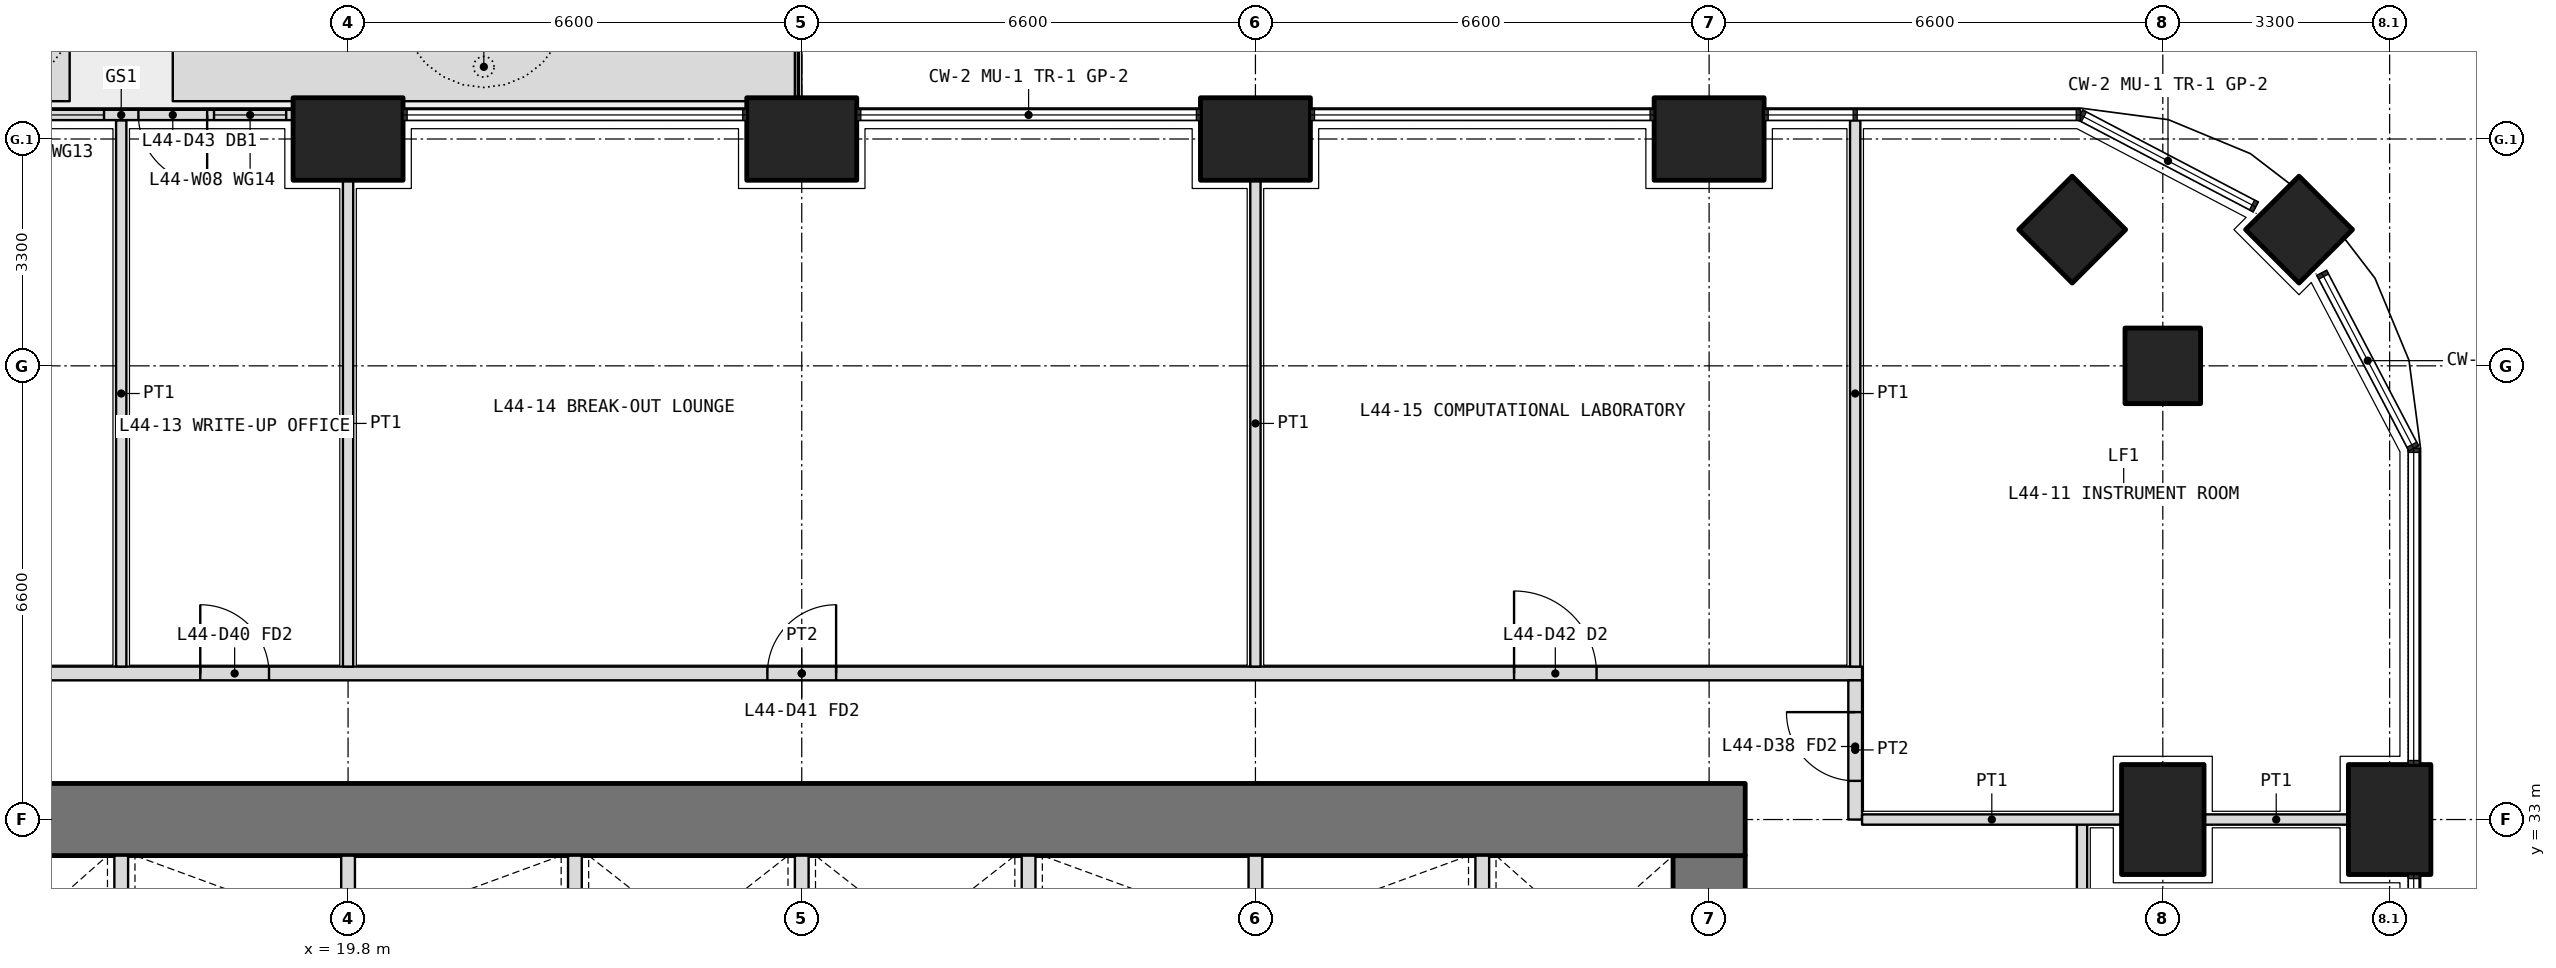
"""IFC4 building model, lengths in metres.
Left out: names, types, materials, properties, quantities, classifications, styles, units other than length and angle.
Written with IfcOpenShell. Run it as: python <this file> out.ifc"""

import sys

from ifc_helpers import new_model, si_unit, direction, frame, frame_2d, origin, origin_2d, place, context, subcontext, project, spatial, polyline, rectangle, outline, extrude, element, fill, save


model = new_model("IFC4")
c1 = context("Model", 3, precision=1e-05, world=origin(), true_north=direction((0.0, 1.0)))
c2 = subcontext(c1, "Body", "Model", "MODEL_VIEW")
j1 = project(units=[si_unit("LENGTHUNIT", "METRE"), si_unit("PLANEANGLEUNIT", "RADIAN")], contexts=[c1])
p1 = place(None, origin())
s1 = spatial("IfcSite", under=j1, at=p1, CompositionType="ELEMENT")
p2 = place(p1, origin())
s2 = spatial("IfcBuilding", under=s1, at=p2, CompositionType="ELEMENT")
p3 = place(p2, frame((0.0, 0.0, 193.5)))
s3 = spatial("IfcBuildingStorey", under=s2, at=p3, CompositionType="ELEMENT", Elevation=193.5)
p4 = place(p3, frame((48.182, 41.582, 0.0), z_axis=(0.0, 0.0, 1.0), x_axis=(0.707106781187, 0.707106781187, 0.0)))
e1 = element("IfcColumn", 1, at=p4, inside=s3, PredefinedType="COLUMN", context=c2, shape_type="SweptSolid", body=[
    extrude(rectangle(XDim=1.1, YDim=1.1, at=origin_2d()), origin(), (0.0, 0.0, 1.0), 4.2),
])
for number, where, z_axis, x_axis in (
    (2, (49.5, 33.0, 0.0), (0.0, 0.0, 1.0), (0.0, 1.0, 0.0)),
    (3, (19.8, 42.9, 0.0), (0.0, 0.0, 1.0), (1.0, 0.0, 0.0)),
    (4, (26.4, 42.9, 0.0), (0.0, 0.0, 1.0), (1.0, 0.0, 0.0)),
    (5, (33.0, 42.9, 0.0), (0.0, 0.0, 1.0), (1.0, 0.0, 0.0)),
    (6, (39.6, 42.9, 0.0), (0.0, 0.0, 1.0), (1.0, 0.0, 0.0)),
):
    element("IfcColumn", number, at=place(p3, frame(where, z_axis=z_axis, x_axis=x_axis)), inside=s3, PredefinedType="COLUMN", context=c2, shape_type="SweptSolid", body=[
        extrude(rectangle(XDim=1.6, YDim=1.2, at=origin_2d()), origin(), (0.0, 0.0, 1.0), 4.2),
    ])
for number, where, z_axis, x_axis in (
    (7, (46.2, 39.6, 0.0), (0.0, 0.0, 1.0), (1.0, 0.0, 0.0)),
    (8, (44.882, 41.582, 0.0), (0.0, 0.0, 1.0), (0.707, 0.707, 0.0)),
):
    element("IfcColumn", number, at=place(p3, frame(where, z_axis=z_axis, x_axis=x_axis)), inside=s3, PredefinedType="COLUMN", context=c2, shape_type="SweptSolid", body=[
        extrude(rectangle(XDim=1.1, YDim=1.1, at=origin_2d()), origin(), (0.0, 0.0, 1.0), 4.2),
    ])
p5 = place(p3, frame((46.2, 33.0, 0.0), z_axis=(0.0, 0.0, 1.0), x_axis=(0.0, 1.0, 0.0)))
e9 = element("IfcColumn", 9, at=p5, inside=s3, PredefinedType="COLUMN", context=c2, shape_type="SweptSolid", body=[
    extrude(rectangle(XDim=1.6, YDim=1.2, at=origin_2d()), origin(), (0.0, 0.0, 1.0), 4.2),
])
p6 = place(p3, origin())
e10 = element("IfcWall", 10, at=p6, inside=s3, PredefinedType="USERDEFINED", context=c2, shape_type="SweptSolid", body=[
    extrude(outline(polyline([(13.3, 43.45), (15.75, 43.45), (15.75, 44.45), (13.3, 44.45), (13.3, 43.45)]), holes=[polyline([(13.45, 43.6), (15.6, 43.6), (15.6, 44.3), (13.45, 44.3), (13.45, 43.6)])]), origin(), (0.0, 0.0, 1.0), 1.05),
])
p7 = place(p3, origin())
e11 = element("IfcWall", 11, at=p7, inside=s3, PredefinedType="USERDEFINED", context=c2, shape_type="SweptSolid", body=[
    extrude(outline(polyline([(17.25, 43.45), (26.3, 43.45), (26.3, 44.45), (17.25, 44.45), (17.25, 43.45)]), holes=[polyline([(17.4, 43.6), (26.15, 43.6), (26.15, 44.3), (17.4, 44.3), (17.4, 43.6)])]), origin(), (0.0, 0.0, 1.0), 1.05),
])
p8 = place(p3, frame((19.0, 43.25, 0.0), z_axis=(0.0, 0.0, 1.0), x_axis=(-1.0, 0.0, 0.0)))
e12 = element("IfcWall", 12, at=p8, inside=s3, PredefinedType="SOLIDWALL", context=c2, shape_type="SweptSolid", body=[
    extrude(rectangle(XDim=5.0, YDim=0.15, at=frame_2d((2.5, 0.0))), origin(), (0.0, 0.0, 1.0), 2.7),
])
p9 = place(p8, frame((1.25, 0.0, 0.0)))
e13 = element("IfcOpeningElement", 13, at=p9, cuts=e12, PredefinedType="OPENING", context=c2, shape_type="SweptSolid", body=[
    extrude(rectangle(XDim=1.0, YDim=2.4, at=frame_2d((0.5, 1.2))), frame((0.0, 0.085, 0.0), z_axis=(0.0, -1.0, 0.0), x_axis=(1.0, 0.0, 0.0)), (0.0, 0.0, 1.0), 0.17),
])
p10 = place(p8, frame((0.1, 0.0, 0.1)))
e14 = element("IfcOpeningElement", 14, at=p10, cuts=e12, PredefinedType="OPENING", context=c2, shape_type="SweptSolid", body=[
    extrude(rectangle(XDim=1.05, YDim=2.3, at=frame_2d((0.525, 1.15))), frame((0.0, 0.085, 0.0), z_axis=(0.0, -1.0, 0.0), x_axis=(1.0, 0.0, 0.0)), (0.0, 0.0, 1.0), 0.17),
])
p11 = place(p8, frame((2.75, 0.0, 0.1)))
e15 = element("IfcOpeningElement", 15, at=p11, cuts=e12, PredefinedType="OPENING", context=c2, shape_type="SweptSolid", body=[
    extrude(rectangle(XDim=2.15, YDim=2.3, at=frame_2d((1.075, 1.15))), frame((0.0, 0.085, 0.0), z_axis=(0.0, -1.0, 0.0), x_axis=(1.0, 0.0, 0.0)), (0.0, 0.0, 1.0), 0.17),
])
p12 = place(p3, frame((39.6, 13.725, 0.0), z_axis=(0.0, 0.0, 1.0), x_axis=(0.0, 1.0, 0.0)))
e16 = element("IfcWall", 16, at=p12, inside=s3, PredefinedType="SHEAR", context=c2, shape_type="SweptSolid", body=[
    extrude(rectangle(XDim=18.75, YDim=1.05, at=frame_2d((9.375, 0.0))), origin(), (0.0, 0.0, 1.0), 4.2),
])
p13 = place(p12, frame((3.025, 0.0, 0.0)))
e17 = element("IfcOpeningElement", 17, at=p13, cuts=e16, PredefinedType="OPENING", context=c2, shape_type="SweptSolid", body=[
    extrude(rectangle(XDim=1.6, YDim=2.1, at=frame_2d((0.8, 1.05))), frame((0.0, 0.535, 0.0), z_axis=(0.0, -1.0, 0.0), x_axis=(1.0, 0.0, 0.0)), (0.0, 0.0, 1.0), 1.07),
])
p14 = place(p12, frame((13.825, 0.0, 0.0)))
e18 = element("IfcOpeningElement", 18, at=p14, cuts=e16, PredefinedType="OPENING", context=c2, shape_type="SweptSolid", body=[
    extrude(rectangle(XDim=1.6, YDim=2.1, at=frame_2d((0.8, 1.05))), frame((0.0, 0.535, 0.0), z_axis=(0.0, -1.0, 0.0), x_axis=(1.0, 0.0, 0.0)), (0.0, 0.0, 1.0), 1.07),
])
p15 = place(p3, frame((40.125, 33.0, 0.0), z_axis=(0.0, 0.0, 1.0), x_axis=(-1.0, 0.0, 0.0)))
e19 = element("IfcWall", 19, at=p15, inside=s3, PredefinedType="SHEAR", context=c2, shape_type="SweptSolid", body=[
    extrude(rectangle(XDim=27.45, YDim=1.05, at=frame_2d((13.725, 0.0))), origin(), (0.0, 0.0, 1.0), 4.2),
])
for number, where, z_axis, x_axis in (
    (20, (16.5, 30.2, 0.0), (0.0, 0.0, 1.0), (0.0, 1.0, 0.0)),
    (21, (19.8, 30.2, 0.0), (0.0, 0.0, 1.0), (0.0, 1.0, 0.0)),
    (22, (23.1, 30.2, 0.0), (0.0, 0.0, 1.0), (0.0, 1.0, 0.0)),
    (23, (26.4, 30.2, 0.0), (0.0, 0.0, 1.0), (0.0, 1.0, 0.0)),
    (24, (29.7, 30.2, 0.0), (0.0, 0.0, 1.0), (0.0, 1.0, 0.0)),
    (25, (33.0, 30.2, 0.0), (0.0, 0.0, 1.0), (0.0, 1.0, 0.0)),
    (26, (36.3, 30.2, 0.0), (0.0, 0.0, 1.0), (0.0, 1.0, 0.0)),
):
    element("IfcWall", number, at=place(p3, frame(where, z_axis=z_axis, x_axis=x_axis)), inside=s3, PredefinedType="PARTITIONING", context=c2, shape_type="SweptSolid", body=[
        extrude(rectangle(XDim=2.275, YDim=0.2, at=frame_2d((1.138, 0.0))), origin(), (0.0, 0.0, 1.0), 4.2),
    ])
p16 = place(p3, frame((10.975, 35.125, 0.0), z_axis=(0.0, 0.0, 1.0), x_axis=(1.0, 0.0, 0.0)))
e27 = element("IfcWall", 27, at=p16, inside=s3, PredefinedType="PARTITIONING", context=c2, shape_type="SweptSolid", body=[
    extrude(rectangle(XDim=30.85, YDim=0.2, at=frame_2d((15.425, 0.0))), origin(), (0.0, 0.0, 1.0), 2.85),
])
p17 = place(p16, frame((2.212, 0.0, 0.0)))
e28 = element("IfcOpeningElement", 28, at=p17, cuts=e27, PredefinedType="OPENING", context=c2, shape_type="SweptSolid", body=[
    extrude(rectangle(XDim=1.2, YDim=2.1, at=frame_2d((0.6, 1.05))), frame((0.0, 0.11, 0.0), z_axis=(0.0, -1.0, 0.0), x_axis=(1.0, 0.0, 0.0)), (0.0, 0.0, 1.0), 0.22),
])
p18 = place(p16, frame((6.675, 0.0, 0.0)))
e29 = element("IfcOpeningElement", 29, at=p18, cuts=e27, PredefinedType="OPENING", context=c2, shape_type="SweptSolid", body=[
    extrude(rectangle(XDim=1.0, YDim=2.1, at=frame_2d((0.5, 1.05))), frame((0.0, 0.11, 0.0), z_axis=(0.0, -1.0, 0.0), x_axis=(1.0, 0.0, 0.0)), (0.0, 0.0, 1.0), 0.22),
])
p19 = place(p16, frame((14.925, 0.0, 0.0)))
e30 = element("IfcOpeningElement", 30, at=p19, cuts=e27, PredefinedType="OPENING", context=c2, shape_type="SweptSolid", body=[
    extrude(rectangle(XDim=1.0, YDim=2.1, at=frame_2d((0.5, 1.05))), frame((0.0, 0.11, 0.0), z_axis=(0.0, -1.0, 0.0), x_axis=(1.0, 0.0, 0.0)), (0.0, 0.0, 1.0), 0.22),
])
p20 = place(p16, frame((25.788, 0.0, 0.0)))
e31 = element("IfcOpeningElement", 31, at=p20, cuts=e27, PredefinedType="OPENING", context=c2, shape_type="SweptSolid", body=[
    extrude(rectangle(XDim=1.2, YDim=2.1, at=frame_2d((0.6, 1.05))), frame((0.0, 0.11, 0.0), z_axis=(0.0, -1.0, 0.0), x_axis=(1.0, 0.0, 0.0)), (0.0, 0.0, 1.0), 0.22),
])
p21 = place(p3, frame((41.725, 33.0, 0.0), z_axis=(0.0, 0.0, 1.0), x_axis=(0.0, 1.0, 0.0)))
e32 = element("IfcWall", 32, at=p21, inside=s3, PredefinedType="PARTITIONING", context=c2, shape_type="SweptSolid", body=[
    extrude(rectangle(XDim=2.025, YDim=0.2, at=frame_2d((1.012, 0.0))), origin(), (0.0, 0.0, 1.0), 2.85),
])
p22 = place(p21, frame((0.562, 0.0, 0.0)))
e33 = element("IfcOpeningElement", 33, at=p22, cuts=e32, PredefinedType="OPENING", context=c2, shape_type="SweptSolid", body=[
    extrude(rectangle(XDim=1.0, YDim=2.1, at=frame_2d((0.5, 1.05))), frame((0.0, 0.11, 0.0), z_axis=(0.0, -1.0, 0.0), x_axis=(1.0, 0.0, 0.0)), (0.0, 0.0, 1.0), 0.22),
])
p23 = place(p3, frame((41.725, 43.17, 0.0), z_axis=(0.0, 0.0, 1.0), x_axis=(0.0, -1.0, 0.0)))
e34 = element("IfcWall", 34, at=p23, inside=s3, PredefinedType="PARTITIONING", context=c2, shape_type="SweptSolid", body=[
    extrude(rectangle(XDim=7.945, YDim=0.15, at=frame_2d((3.972, 0.0))), origin(), (0.0, 0.0, 1.0), 2.7),
])
p24 = place(p3, frame((45.025, 29.7, 0.0), z_axis=(0.0, 0.0, 1.0), x_axis=(0.0, 1.0, 0.0)))
e35 = element("IfcWall", 35, at=p24, inside=s3, PredefinedType="PARTITIONING", context=c2, shape_type="SweptSolid", body=[
    extrude(rectangle(XDim=3.3, YDim=0.15, at=frame_2d((1.65, 0.0))), origin(), (0.0, 0.0, 1.0), 2.85),
])
p25 = place(p24, frame((1.15, 0.0, 0.0)))
e36 = element("IfcOpeningElement", 36, at=p25, cuts=e35, PredefinedType="OPENING", context=c2, shape_type="SweptSolid", body=[
    extrude(rectangle(XDim=1.0, YDim=2.1, at=frame_2d((0.5, 1.05))), frame((0.0, 0.085, 0.0), z_axis=(0.0, -1.0, 0.0), x_axis=(1.0, 0.0, 0.0)), (0.0, 0.0, 1.0), 0.17),
])
p26 = place(p3, frame((48.9, 33.0, 0.0), z_axis=(0.0, 0.0, 1.0), x_axis=(-1.0, 0.0, 0.0)))
e37 = element("IfcWall", 37, at=p26, inside=s3, PredefinedType="PARTITIONING", context=c2, shape_type="SweptSolid", body=[
    extrude(rectangle(XDim=2.1, YDim=0.15, at=frame_2d((1.05, 0.0))), origin(), (0.0, 0.0, 1.0), 2.85),
])
p27 = place(p3, frame((45.6, 33.0, 0.0), z_axis=(0.0, 0.0, 1.0), x_axis=(-1.0, 0.0, 0.0)))
e38 = element("IfcWall", 38, at=p27, inside=s3, PredefinedType="PARTITIONING", context=c2, shape_type="SweptSolid", body=[
    extrude(rectangle(XDim=3.775, YDim=0.15, at=frame_2d((1.888, 0.0))), origin(), (0.0, 0.0, 1.0), 2.85),
])
p28 = place(p3, frame((16.5, 43.17, 0.0), z_axis=(0.0, 0.0, 1.0), x_axis=(0.0, -1.0, 0.0)))
e39 = element("IfcWall", 39, at=p28, inside=s3, PredefinedType="PARTITIONING", context=c2, shape_type="SweptSolid", body=[
    extrude(rectangle(XDim=7.945, YDim=0.15, at=frame_2d((3.972, 0.0))), origin(), (0.0, 0.0, 1.0), 2.7),
])
for number, where, z_axis, x_axis in (
    (40, (19.8, 42.3, 0.0), (0.0, 0.0, 1.0), (0.0, -1.0, 0.0)),
    (41, (33.0, 42.3, 0.0), (0.0, 0.0, 1.0), (0.0, -1.0, 0.0)),
):
    element("IfcWall", number, at=place(p3, frame(where, z_axis=z_axis, x_axis=x_axis)), inside=s3, PredefinedType="PARTITIONING", context=c2, shape_type="SweptSolid", body=[
        extrude(rectangle(XDim=7.075, YDim=0.15, at=frame_2d((3.538, 0.0))), origin(), (0.0, 0.0, 1.0), 2.85),
    ])
p29 = place(p9, origin())
e42 = element("IfcDoor", 42, at=p29, inside=s3, OperationType="SINGLE_SWING_LEFT", PredefinedType="DOOR", context=c2, shape_type="SweptSolid", body=[
    extrude(rectangle(XDim=1.0, YDim=2.4, at=frame_2d((0.5, 1.2))), frame((0.0, 0.025, 0.0), z_axis=(0.0, -1.0, 0.0), x_axis=(1.0, 0.0, 0.0)), (0.0, 0.0, 1.0), 0.05),
])
fill(e13, e42)
p30 = place(p10, origin())
e43 = element("IfcWindow", 43, at=p30, inside=s3, PartitioningType="SINGLE_PANEL", PredefinedType="WINDOW", context=c2, shape_type="SweptSolid", body=[
    extrude(rectangle(XDim=1.05, YDim=2.3, at=frame_2d((0.525, 1.15))), frame((0.0, 0.03, 0.0), z_axis=(0.0, -1.0, 0.0), x_axis=(1.0, 0.0, 0.0)), (0.0, 0.0, 1.0), 0.06),
])
fill(e14, e43)
p31 = place(p11, origin())
e44 = element("IfcWindow", 44, at=p31, inside=s3, PartitioningType="SINGLE_PANEL", PredefinedType="WINDOW", context=c2, shape_type="SweptSolid", body=[
    extrude(rectangle(XDim=2.15, YDim=2.3, at=frame_2d((1.075, 1.15))), frame((0.0, 0.03, 0.0), z_axis=(0.0, -1.0, 0.0), x_axis=(1.0, 0.0, 0.0)), (0.0, 0.0, 1.0), 0.06),
])
fill(e15, e44)
p32 = place(p22, origin())
e45 = element("IfcDoor", 45, at=p32, inside=s3, OperationType="SINGLE_SWING_RIGHT", PredefinedType="DOOR", context=c2, shape_type="SweptSolid", body=[
    extrude(rectangle(XDim=1.0, YDim=2.1, at=frame_2d((0.5, 1.05))), frame((0.0, 0.025, 0.0), z_axis=(0.0, -1.0, 0.0), x_axis=(1.0, 0.0, 0.0)), (0.0, 0.0, 1.0), 0.05),
])
fill(e33, e45)
p33 = place(p18, origin())
e46 = element("IfcDoor", 46, at=p33, inside=s3, OperationType="SINGLE_SWING_LEFT", PredefinedType="DOOR", context=c2, shape_type="SweptSolid", body=[
    extrude(rectangle(XDim=1.0, YDim=2.1, at=frame_2d((0.5, 1.05))), frame((0.0, 0.025, 0.0), z_axis=(0.0, -1.0, 0.0), x_axis=(1.0, 0.0, 0.0)), (0.0, 0.0, 1.0), 0.05),
])
fill(e29, e46)
p34 = place(p19, origin())
e47 = element("IfcDoor", 47, at=p34, inside=s3, OperationType="SINGLE_SWING_RIGHT", PredefinedType="DOOR", context=c2, shape_type="SweptSolid", body=[
    extrude(rectangle(XDim=1.0, YDim=2.1, at=frame_2d((0.5, 1.05))), frame((0.0, 0.025, 0.0), z_axis=(0.0, -1.0, 0.0), x_axis=(1.0, 0.0, 0.0)), (0.0, 0.0, 1.0), 0.05),
])
fill(e30, e47)
p35 = place(p20, origin())
e48 = element("IfcDoor", 48, at=p35, inside=s3, OperationType="DOUBLE_DOOR_SINGLE_SWING", PredefinedType="DOOR", context=c2, shape_type="SweptSolid", body=[
    extrude(rectangle(XDim=1.2, YDim=2.1, at=frame_2d((0.6, 1.05))), frame((0.0, 0.025, 0.0), z_axis=(0.0, -1.0, 0.0), x_axis=(1.0, 0.0, 0.0)), (0.0, 0.0, 1.0), 0.05),
])
fill(e31, e48)
save(model, sys.argv[1])
